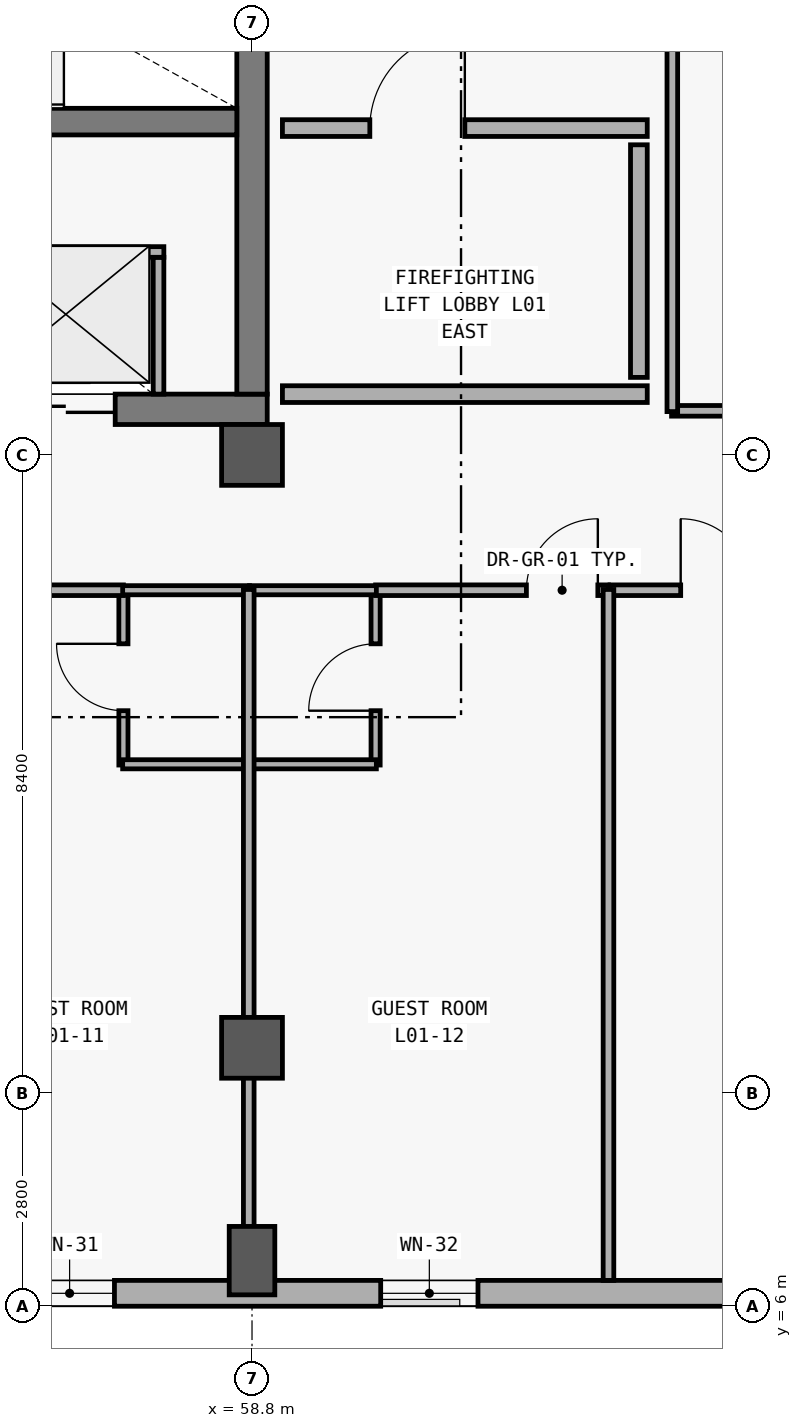
"""IFC4 building model, lengths in metres.
Left out: names, types, materials, properties, quantities, classifications, styles, units other than length and angle.
Written with IfcOpenShell. Run it as: python <this file> out.ifc"""

import sys

from ifc_helpers import new_model, si_unit, direction, frame, frame_2d, origin, origin_2d, place, context, subcontext, project, spatial, rectangle, extrude, element, fill, save


model = new_model("IFC4")
c1 = context("Model", 3, precision=1e-05, world=origin(), true_north=direction((0.0, 1.0)))
c2 = subcontext(c1, "Body", "Model", "MODEL_VIEW")
j1 = project(units=[si_unit("LENGTHUNIT", "METRE"), si_unit("PLANEANGLEUNIT", "RADIAN")], contexts=[c1])
p1 = place(None, origin())
s1 = spatial("IfcSite", under=j1, at=p1, CompositionType="ELEMENT")
p2 = place(p1, origin())
s2 = spatial("IfcBuilding", under=s1, at=p2, CompositionType="ELEMENT")
p3 = place(p2, frame((0.0, 0.0, 5.4)))
s3 = spatial("IfcBuildingStorey", under=s2, at=p3, CompositionType="ELEMENT", Elevation=5.4)
p4 = place(p3, frame((58.8, 6.6, 0.0), z_axis=(0.0, 0.0, 1.0), x_axis=(0.0, 1.0, 0.0)))
e1 = element("IfcColumn", 1, at=p4, inside=s3, PredefinedType="COLUMN", context=c2, shape_type="SweptSolid", body=[
    extrude(rectangle(XDim=0.6, YDim=0.9, at=origin_2d()), origin(), (0.0, 0.0, 1.0), 5.4),
])
for number, where, z_axis, x_axis in (
    (2, (58.8, 9.4, 0.0), (0.0, 0.0, 1.0), (1.0, 0.0, 0.0)),
    (3, (58.8, 17.2, 0.0), (0.0, 0.0, 1.0), (1.0, 0.0, 0.0)),
):
    element("IfcColumn", number, at=place(p3, frame(where, z_axis=z_axis, x_axis=x_axis)), inside=s3, PredefinedType="COLUMN", context=c2, shape_type="SweptSolid", body=[
        extrude(rectangle(XDim=0.8, YDim=0.8, at=origin_2d()), origin(), (0.0, 0.0, 1.0), 5.4),
    ])
p5 = place(p3, frame((92.06, 6.17, 0.0), z_axis=(0.0, 0.0, 1.0), x_axis=(-1.0, 0.0, 0.0)))
e4 = element("IfcWall", 4, at=p5, inside=s3, PredefinedType="SOLIDWALL", context=c2, shape_type="SweptSolid", body=[
    extrude(rectangle(XDim=83.32, YDim=0.34, at=frame_2d((41.66, 0.0))), origin(), (0.0, 0.0, 1.0), 5.1),
])
p6 = place(p5, frame((80.804, 0.0, 0.85)))
e5 = element("IfcOpeningElement", 5, at=p6, cuts=e4, PredefinedType="OPENING", context=c2, shape_type="SweptSolid", body=[
    extrude(rectangle(XDim=1.8, YDim=1.8, at=frame_2d((0.9, 0.9))), frame((0.0, 0.18, 0.0), z_axis=(0.0, -1.0, 0.0), x_axis=(1.0, 0.0, 0.0)), (0.0, 0.0, 1.0), 0.36),
])
p7 = place(p5, frame((78.043, 0.0, 0.85)))
e6 = element("IfcOpeningElement", 6, at=p7, cuts=e4, PredefinedType="OPENING", context=c2, shape_type="SweptSolid", body=[
    extrude(rectangle(XDim=1.5, YDim=1.75, at=frame_2d((0.75, 0.875))), frame((0.0, 0.18, 0.0), z_axis=(0.0, -1.0, 0.0), x_axis=(1.0, 0.0, 0.0)), (0.0, 0.0, 1.0), 0.36),
])
p8 = place(p5, frame((75.057, 0.0, 0.85)))
e7 = element("IfcOpeningElement", 7, at=p8, cuts=e4, PredefinedType="OPENING", context=c2, shape_type="SweptSolid", body=[
    extrude(rectangle(XDim=1.65, YDim=1.75, at=frame_2d((0.825, 0.875))), frame((0.0, 0.18, 0.0), z_axis=(0.0, -1.0, 0.0), x_axis=(1.0, 0.0, 0.0)), (0.0, 0.0, 1.0), 0.36),
])
p9 = place(p5, frame((71.997, 0.0, 0.85)))
e8 = element("IfcOpeningElement", 8, at=p9, cuts=e4, PredefinedType="OPENING", context=c2, shape_type="SweptSolid", body=[
    extrude(rectangle(XDim=1.95, YDim=1.75, at=frame_2d((0.975, 0.875))), frame((0.0, 0.18, 0.0), z_axis=(0.0, -1.0, 0.0), x_axis=(1.0, 0.0, 0.0)), (0.0, 0.0, 1.0), 0.36),
])
p10 = place(p5, frame((69.36, 0.0, 0.85)))
e9 = element("IfcOpeningElement", 9, at=p10, cuts=e4, PredefinedType="OPENING", context=c2, shape_type="SweptSolid", body=[
    extrude(rectangle(XDim=1.4, YDim=1.6, at=frame_2d((0.7, 0.8))), frame((0.0, 0.18, 0.0), z_axis=(0.0, -1.0, 0.0), x_axis=(1.0, 0.0, 0.0)), (0.0, 0.0, 1.0), 0.36),
])
p11 = place(p5, frame((66.349, 0.0, 0.85)))
e10 = element("IfcOpeningElement", 10, at=p11, cuts=e4, PredefinedType="OPENING", context=c2, shape_type="SweptSolid", body=[
    extrude(rectangle(XDim=1.6, YDim=1.6, at=frame_2d((0.8, 0.8))), frame((0.0, 0.18, 0.0), z_axis=(0.0, -1.0, 0.0), x_axis=(1.0, 0.0, 0.0)), (0.0, 0.0, 1.0), 0.36),
])
p12 = place(p5, frame((63.338, 0.0, 0.85)))
e11 = element("IfcOpeningElement", 11, at=p12, cuts=e4, PredefinedType="OPENING", context=c2, shape_type="SweptSolid", body=[
    extrude(rectangle(XDim=1.8, YDim=1.6, at=frame_2d((0.9, 0.8))), frame((0.0, 0.18, 0.0), z_axis=(0.0, -1.0, 0.0), x_axis=(1.0, 0.0, 0.0)), (0.0, 0.0, 1.0), 0.36),
])
p13 = place(p5, frame((60.327, 0.0, 0.85)))
e12 = element("IfcOpeningElement", 12, at=p13, cuts=e4, PredefinedType="OPENING", context=c2, shape_type="SweptSolid", body=[
    extrude(rectangle(XDim=2.0, YDim=1.65, at=frame_2d((1.0, 0.825))), frame((0.0, 0.18, 0.0), z_axis=(0.0, -1.0, 0.0), x_axis=(1.0, 0.0, 0.0)), (0.0, 0.0, 1.0), 0.36),
])
p14 = place(p5, frame((57.791, 0.0, 0.85)))
e13 = element("IfcOpeningElement", 13, at=p14, cuts=e4, PredefinedType="OPENING", context=c2, shape_type="SweptSolid", body=[
    extrude(rectangle(XDim=1.25, YDim=1.45, at=frame_2d((0.625, 0.725))), frame((0.0, 0.18, 0.0), z_axis=(0.0, -1.0, 0.0), x_axis=(1.0, 0.0, 0.0)), (0.0, 0.0, 1.0), 0.36),
])
p15 = place(p5, frame((38.744, 0.0, 0.85)))
e14 = element("IfcOpeningElement", 14, at=p15, cuts=e4, PredefinedType="OPENING", context=c2, shape_type="SweptSolid", body=[
    extrude(rectangle(XDim=3.3, YDim=2.15, at=frame_2d((1.65, 1.075))), frame((0.0, 0.18, 0.0), z_axis=(0.0, -1.0, 0.0), x_axis=(1.0, 0.0, 0.0)), (0.0, 0.0, 1.0), 0.36),
])
p16 = place(p5, frame((35.07, 0.0, 0.85)))
e15 = element("IfcOpeningElement", 15, at=p16, cuts=e4, PredefinedType="OPENING", context=c2, shape_type="SweptSolid", body=[
    extrude(rectangle(XDim=1.18, YDim=1.5, at=frame_2d((0.59, 0.75))), frame((0.0, 0.18, 0.0), z_axis=(0.0, -1.0, 0.0), x_axis=(1.0, 0.0, 0.0)), (0.0, 0.0, 1.0), 0.36),
])
p17 = place(p5, frame((30.287, 0.0, 0.85)))
e16 = element("IfcOpeningElement", 16, at=p17, cuts=e4, PredefinedType="OPENING", context=c2, shape_type="SweptSolid", body=[
    extrude(rectangle(XDim=1.28, YDim=1.6, at=frame_2d((0.64, 0.8))), frame((0.0, 0.18, 0.0), z_axis=(0.0, -1.0, 0.0), x_axis=(1.0, 0.0, 0.0)), (0.0, 0.0, 1.0), 0.36),
])
p18 = place(p5, frame((25.503, 0.0, 0.85)))
e17 = element("IfcOpeningElement", 17, at=p18, cuts=e4, PredefinedType="OPENING", context=c2, shape_type="SweptSolid", body=[
    extrude(rectangle(XDim=1.38, YDim=1.7, at=frame_2d((0.69, 0.85))), frame((0.0, 0.18, 0.0), z_axis=(0.0, -1.0, 0.0), x_axis=(1.0, 0.0, 0.0)), (0.0, 0.0, 1.0), 0.36),
])
p19 = place(p5, frame((20.72, 0.0, 0.85)))
e18 = element("IfcOpeningElement", 18, at=p19, cuts=e4, PredefinedType="OPENING", context=c2, shape_type="SweptSolid", body=[
    extrude(rectangle(XDim=1.48, YDim=1.8, at=frame_2d((0.74, 0.9))), frame((0.0, 0.18, 0.0), z_axis=(0.0, -1.0, 0.0), x_axis=(1.0, 0.0, 0.0)), (0.0, 0.0, 1.0), 0.36),
])
p20 = place(p5, frame((15.937, 0.0, 0.85)))
e19 = element("IfcOpeningElement", 19, at=p20, cuts=e4, PredefinedType="OPENING", context=c2, shape_type="SweptSolid", body=[
    extrude(rectangle(XDim=1.58, YDim=1.85, at=frame_2d((0.79, 0.925))), frame((0.0, 0.18, 0.0), z_axis=(0.0, -1.0, 0.0), x_axis=(1.0, 0.0, 0.0)), (0.0, 0.0, 1.0), 0.36),
])
p21 = place(p5, frame((11.154, 0.0, 0.85)))
e20 = element("IfcOpeningElement", 20, at=p21, cuts=e4, PredefinedType="OPENING", context=c2, shape_type="SweptSolid", body=[
    extrude(rectangle(XDim=1.68, YDim=1.9, at=frame_2d((0.84, 0.95))), frame((0.0, 0.18, 0.0), z_axis=(0.0, -1.0, 0.0), x_axis=(1.0, 0.0, 0.0)), (0.0, 0.0, 1.0), 0.36),
])
p22 = place(p5, frame((6.37, 0.0, 0.85)))
e21 = element("IfcOpeningElement", 21, at=p22, cuts=e4, PredefinedType="OPENING", context=c2, shape_type="SweptSolid", body=[
    extrude(rectangle(XDim=1.78, YDim=1.95, at=frame_2d((0.89, 0.975))), frame((0.0, 0.18, 0.0), z_axis=(0.0, -1.0, 0.0), x_axis=(1.0, 0.0, 0.0)), (0.0, 0.0, 1.0), 0.36),
])
p23 = place(p5, frame((1.586, 0.0, 0.85)))
e22 = element("IfcOpeningElement", 22, at=p23, cuts=e4, PredefinedType="OPENING", context=c2, shape_type="SweptSolid", body=[
    extrude(rectangle(XDim=1.88, YDim=1.95, at=frame_2d((0.94, 0.975))), frame((0.0, 0.18, 0.0), z_axis=(0.0, -1.0, 0.0), x_axis=(1.0, 0.0, 0.0)), (0.0, 0.0, 1.0), 0.36),
])
p24 = place(p3, frame((49.8, 17.8, 0.0), z_axis=(0.0, 0.0, 1.0), x_axis=(1.0, 0.0, 0.0)))
e23 = element("IfcWall", 23, at=p24, inside=s3, PredefinedType="SHEAR", context=c2, shape_type="SweptSolid", body=[
    extrude(rectangle(XDim=9.2, YDim=0.4, at=frame_2d((4.6, 0.0))), origin(), (0.0, 0.0, 1.0), 5.08),
])
p25 = place(p24, frame((1.1, 0.0, 0.0)))
e24 = element("IfcOpeningElement", 24, at=p25, cuts=e23, PredefinedType="OPENING", context=c2, shape_type="SweptSolid", body=[
    extrude(rectangle(XDim=1.2, YDim=2.2, at=frame_2d((0.6, 1.1))), frame((0.0, 0.21, 0.0), z_axis=(0.0, -1.0, 0.0), x_axis=(1.0, 0.0, 0.0)), (0.0, 0.0, 1.0), 0.42),
])
p26 = place(p24, frame((3.5, 0.0, 0.0)))
e25 = element("IfcOpeningElement", 25, at=p26, cuts=e23, PredefinedType="OPENING", context=c2, shape_type="SweptSolid", body=[
    extrude(rectangle(XDim=1.1, YDim=2.2, at=frame_2d((0.55, 1.1))), frame((0.0, 0.21, 0.0), z_axis=(0.0, -1.0, 0.0), x_axis=(1.0, 0.0, 0.0)), (0.0, 0.0, 1.0), 0.42),
])
p27 = place(p24, frame((5.9, 0.0, 0.0)))
e26 = element("IfcOpeningElement", 26, at=p27, cuts=e23, PredefinedType="OPENING", context=c2, shape_type="SweptSolid", body=[
    extrude(rectangle(XDim=1.3, YDim=2.3, at=frame_2d((0.65, 1.15))), frame((0.0, 0.21, 0.0), z_axis=(0.0, -1.0, 0.0), x_axis=(1.0, 0.0, 0.0)), (0.0, 0.0, 1.0), 0.42),
])
p28 = place(p3, frame((58.8, 18.0, 0.0), z_axis=(0.0, 0.0, 1.0), x_axis=(0.0, 1.0, 0.0)))
e27 = element("IfcWall", 27, at=p28, inside=s3, PredefinedType="SHEAR", context=c2, shape_type="SweptSolid", body=[
    extrude(rectangle(XDim=7.4, YDim=0.4, at=frame_2d((3.7, 0.0))), origin(), (0.0, 0.0, 1.0), 5.08),
])
p29 = place(p3, frame((50.2, 21.585, 0.0), z_axis=(0.0, 0.0, 1.0), x_axis=(1.0, 0.0, 0.0)))
e28 = element("IfcWall", 28, at=p29, inside=s3, PredefinedType="SHEAR", context=c2, shape_type="SweptSolid", body=[
    extrude(rectangle(XDim=8.4, YDim=0.35, at=frame_2d((4.2, 0.0))), origin(), (0.0, 0.0, 1.0), 5.08),
])
p30 = place(p3, frame((57.57, 18.0, 0.0), z_axis=(0.0, 0.0, 1.0), x_axis=(0.0, 1.0, 0.0)))
e29 = element("IfcWall", 29, at=p30, inside=s3, PredefinedType="PARTITIONING", context=c2, shape_type="SweptSolid", body=[
    extrude(rectangle(XDim=1.8, YDim=0.14, at=frame_2d((0.9, 0.0))), origin(), (0.0, 0.0, 1.0), 4.23),
])
p31 = place(p3, frame((50.26, 19.87, 0.0), z_axis=(0.0, 0.0, 1.0), x_axis=(1.0, 0.0, 0.0)))
e30 = element("IfcWall", 30, at=p31, inside=s3, PredefinedType="PARTITIONING", context=c2, shape_type="SweptSolid", body=[
    extrude(rectangle(XDim=7.38, YDim=0.14, at=frame_2d((3.69, 0.0))), origin(), (0.0, 0.0, 1.0), 4.23),
])
p32 = place(p3, frame((59.2, 18.0, 0.0), z_axis=(0.0, 0.0, 1.0), x_axis=(1.0, 0.0, 0.0)))
e31 = element("IfcWall", 31, at=p32, inside=s3, PredefinedType="SOLIDWALL", context=c2, shape_type="SweptSolid", body=[
    extrude(rectangle(XDim=4.8, YDim=0.22, at=frame_2d((2.4, 0.0))), origin(), (0.0, 0.0, 1.0), 4.23),
])
p33 = place(p3, frame((59.2, 21.5, 0.0), z_axis=(0.0, 0.0, 1.0), x_axis=(1.0, 0.0, 0.0)))
e32 = element("IfcWall", 32, at=p33, inside=s3, PredefinedType="SOLIDWALL", context=c2, shape_type="SweptSolid", body=[
    extrude(rectangle(XDim=4.8, YDim=0.22, at=frame_2d((2.4, 0.0))), origin(), (0.0, 0.0, 1.0), 4.23),
])
p34 = place(p33, frame((1.15, 0.0, 0.0)))
e33 = element("IfcOpeningElement", 33, at=p34, cuts=e32, PredefinedType="OPENING", context=c2, shape_type="SweptSolid", body=[
    extrude(rectangle(XDim=1.25, YDim=2.2, at=frame_2d((0.625, 1.1))), frame((0.0, 0.12, 0.0), z_axis=(0.0, -1.0, 0.0), x_axis=(1.0, 0.0, 0.0)), (0.0, 0.0, 1.0), 0.24),
])
p35 = place(p3, frame((63.89, 18.22, 0.0), z_axis=(0.0, 0.0, 1.0), x_axis=(0.0, 1.0, 0.0)))
e34 = element("IfcWall", 34, at=p35, inside=s3, PredefinedType="SOLIDWALL", context=c2, shape_type="SweptSolid", body=[
    extrude(rectangle(XDim=3.06, YDim=0.22, at=frame_2d((1.53, 0.0))), origin(), (0.0, 0.0, 1.0), 4.23),
])
p36 = place(p3, frame((57.108, 13.12, 0.0), z_axis=(0.0, 0.0, 1.0), x_axis=(0.0, 1.0, 0.0)))
e35 = element("IfcWall", 35, at=p36, inside=s3, PredefinedType="PARTITIONING", context=c2, shape_type="SweptSolid", body=[
    extrude(rectangle(XDim=2.31, YDim=0.12, at=frame_2d((1.155, 0.0))), origin(), (0.0, 0.0, 1.0), 4.18),
])
p37 = place(p36, frame((0.715, 0.0, 0.0)))
e36 = element("IfcOpeningElement", 36, at=p37, cuts=e35, PredefinedType="OPENING", context=c2, shape_type="SweptSolid", body=[
    extrude(rectangle(XDim=0.88, YDim=2.15, at=frame_2d((0.44, 1.075))), frame((0.0, 0.07, 0.0), z_axis=(0.0, -1.0, 0.0), x_axis=(1.0, 0.0, 0.0)), (0.0, 0.0, 1.0), 0.14),
])
p38 = place(p3, frame((60.426, 13.12, 0.0), z_axis=(0.0, 0.0, 1.0), x_axis=(0.0, 1.0, 0.0)))
e37 = element("IfcWall", 37, at=p38, inside=s3, PredefinedType="PARTITIONING", context=c2, shape_type="SweptSolid", body=[
    extrude(rectangle(XDim=2.31, YDim=0.12, at=frame_2d((1.155, 0.0))), origin(), (0.0, 0.0, 1.0), 4.18),
])
p39 = place(p38, frame((0.715, 0.0, 0.0)))
e38 = element("IfcOpeningElement", 38, at=p39, cuts=e37, PredefinedType="OPENING", context=c2, shape_type="SweptSolid", body=[
    extrude(rectangle(XDim=0.88, YDim=2.15, at=frame_2d((0.44, 1.075))), frame((0.0, 0.07, 0.0), z_axis=(0.0, -1.0, 0.0), x_axis=(1.0, 0.0, 0.0)), (0.0, 0.0, 1.0), 0.14),
])
p40 = place(p3, frame((64.32, 17.78, 0.0), z_axis=(0.0, 0.0, 1.0), x_axis=(1.0, 0.0, 0.0)))
e39 = element("IfcWall", 39, at=p40, inside=s3, PredefinedType="PARTITIONING", context=c2, shape_type="SweptSolid", body=[
    extrude(rectangle(XDim=27.74, YDim=0.14, at=frame_2d((13.87, 0.0))), origin(), (0.0, 0.0, 1.0), 4.18),
])
p41 = place(p40, frame((5.958, 0.0, 0.0)))
e40 = element("IfcOpeningElement", 40, at=p41, cuts=e39, PredefinedType="OPENING", context=c2, shape_type="SweptSolid", body=[
    extrude(rectangle(XDim=1.08, YDim=2.25, at=frame_2d((0.54, 1.125))), frame((0.0, 0.08, 0.0), z_axis=(0.0, -1.0, 0.0), x_axis=(1.0, 0.0, 0.0)), (0.0, 0.0, 1.0), 0.16),
])
p42 = place(p3, frame((54.043, 15.42, 0.0), z_axis=(0.0, 0.0, 1.0), x_axis=(1.0, 0.0, 0.0)))
e41 = element("IfcWall", 41, at=p42, inside=s3, PredefinedType="PARTITIONING", context=c2, shape_type="SweptSolid", body=[
    extrude(rectangle(XDim=3.065, YDim=0.14, at=frame_2d((1.532, 0.0))), origin(), (0.0, 0.0, 1.0), 4.18),
])
p43 = place(p42, frame((0.799, 0.0, 0.0)))
e42 = element("IfcOpeningElement", 42, at=p43, cuts=e41, PredefinedType="OPENING", context=c2, shape_type="SweptSolid", body=[
    extrude(rectangle(XDim=0.94, YDim=2.2, at=frame_2d((0.47, 1.1))), frame((0.0, 0.08, 0.0), z_axis=(0.0, -1.0, 0.0), x_axis=(1.0, 0.0, 0.0)), (0.0, 0.0, 1.0), 0.16),
])
p44 = place(p3, frame((60.426, 15.42, 0.0), z_axis=(0.0, 0.0, 1.0), x_axis=(1.0, 0.0, 0.0)))
e43 = element("IfcWall", 43, at=p44, inside=s3, PredefinedType="PARTITIONING", context=c2, shape_type="SweptSolid", body=[
    extrude(rectangle(XDim=3.064, YDim=0.14, at=frame_2d((1.532, 0.0))), origin(), (0.0, 0.0, 1.0), 4.18),
])
p45 = place(p44, frame((1.984, 0.0, 0.0)))
e44 = element("IfcOpeningElement", 44, at=p45, cuts=e43, PredefinedType="OPENING", context=c2, shape_type="SweptSolid", body=[
    extrude(rectangle(XDim=0.94, YDim=2.2, at=frame_2d((0.47, 1.1))), frame((0.0, 0.08, 0.0), z_axis=(0.0, -1.0, 0.0), x_axis=(1.0, 0.0, 0.0)), (0.0, 0.0, 1.0), 0.16),
])
p46 = place(p3, frame((63.51, 15.42, 0.0), z_axis=(0.0, 0.0, 1.0), x_axis=(1.0, 0.0, 0.0)))
e45 = element("IfcWall", 45, at=p46, inside=s3, PredefinedType="PARTITIONING", context=c2, shape_type="SweptSolid", body=[
    extrude(rectangle(XDim=3.064, YDim=0.14, at=frame_2d((1.532, 0.0))), origin(), (0.0, 0.0, 1.0), 4.18),
])
p47 = place(p46, frame((0.93, 0.0, 0.0)))
e46 = element("IfcOpeningElement", 46, at=p47, cuts=e45, PredefinedType="OPENING", context=c2, shape_type="SweptSolid", body=[
    extrude(rectangle(XDim=0.94, YDim=2.2, at=frame_2d((0.47, 1.1))), frame((0.0, 0.08, 0.0), z_axis=(0.0, -1.0, 0.0), x_axis=(1.0, 0.0, 0.0)), (0.0, 0.0, 1.0), 0.16),
])
for number, where, z_axis, x_axis in (
    (47, (57.098, 13.13, 0.0), (0.0, 0.0, 1.0), (1.0, 0.0, 0.0)),
    (48, (57.098, 15.42, 0.0), (0.0, 0.0, 1.0), (1.0, 0.0, 0.0)),
):
    element("IfcWall", number, at=place(p3, frame(where, z_axis=z_axis, x_axis=x_axis)), inside=s3, PredefinedType="PARTITIONING", context=c2, shape_type="SweptSolid", body=[
        extrude(rectangle(XDim=1.669, YDim=0.12, at=frame_2d((0.834, 0.0))), origin(), (0.0, 0.0, 1.0), 4.18),
    ])
for number, where, z_axis, x_axis in (
    (49, (58.767, 13.13, 0.0), (0.0, 0.0, 1.0), (1.0, 0.0, 0.0)),
    (50, (58.767, 15.42, 0.0), (0.0, 0.0, 1.0), (1.0, 0.0, 0.0)),
):
    element("IfcWall", number, at=place(p3, frame(where, z_axis=z_axis, x_axis=x_axis)), inside=s3, PredefinedType="PARTITIONING", context=c2, shape_type="SweptSolid", body=[
        extrude(rectangle(XDim=1.669, YDim=0.12, at=frame_2d((0.834, 0.0))), origin(), (0.0, 0.0, 1.0), 4.18),
    ])
p48 = place(p3, frame((64.33, 17.77, 0.0), z_axis=(0.0, 0.0, 1.0), x_axis=(0.0, 1.0, 0.0)))
e51 = element("IfcWall", 51, at=p48, inside=s3, PredefinedType="PARTITIONING", context=c2, shape_type="SweptSolid", body=[
    extrude(rectangle(XDim=7.36, YDim=0.14, at=frame_2d((3.68, 0.0))), origin(), (0.0, 0.0, 1.0), 4.18),
])
for number, where, z_axis, x_axis in (
    (52, (58.757, 6.34, 0.0), (0.0, 0.0, 1.0), (0.0, 1.0, 0.0)),
    (53, (63.49, 6.34, 0.0), (0.0, 0.0, 1.0), (0.0, 1.0, 0.0)),
):
    element("IfcWall", number, at=place(p3, frame(where, z_axis=z_axis, x_axis=x_axis)), inside=s3, PredefinedType="PARTITIONING", context=c2, shape_type="SweptSolid", body=[
        extrude(rectangle(XDim=9.09, YDim=0.14, at=frame_2d((4.545, 0.0))), origin(), (0.0, 0.0, 1.0), 4.18),
    ])
p49 = place(p16, origin())
e54 = element("IfcWindow", 54, at=p49, inside=s3, PartitioningType="SINGLE_PANEL", PredefinedType="WINDOW", context=c2, shape_type="SweptSolid", body=[
    extrude(rectangle(XDim=1.18, YDim=1.5, at=frame_2d((0.59, 0.75))), frame((0.0, 0.03, 0.0), z_axis=(0.0, -1.0, 0.0), x_axis=(1.0, 0.0, 0.0)), (0.0, 0.0, 1.0), 0.06),
])
fill(e15, e54)
p50 = place(p17, origin())
e55 = element("IfcWindow", 55, at=p50, inside=s3, PartitioningType="SINGLE_PANEL", PredefinedType="WINDOW", context=c2, shape_type="SweptSolid", body=[
    extrude(rectangle(XDim=1.28, YDim=1.6, at=frame_2d((0.64, 0.8))), frame((0.0, 0.03, 0.0), z_axis=(0.0, -1.0, 0.0), x_axis=(1.0, 0.0, 0.0)), (0.0, 0.0, 1.0), 0.06),
])
fill(e16, e55)
p51 = place(p27, origin())
e56 = element("IfcDoor", 56, at=p51, inside=s3, OperationType="DOUBLE_DOOR_SLIDING", PredefinedType="DOOR", context=c2, shape_type="SweptSolid", body=[
    extrude(rectangle(XDim=1.3, YDim=2.3, at=frame_2d((0.65, 1.15))), frame((0.0, 0.025, 0.0), z_axis=(0.0, -1.0, 0.0), x_axis=(1.0, 0.0, 0.0)), (0.0, 0.0, 1.0), 0.05),
])
fill(e26, e56)
p52 = place(p34, origin())
e57 = element("IfcDoor", 57, at=p52, inside=s3, OperationType="SINGLE_SWING_RIGHT", PredefinedType="DOOR", context=c2, shape_type="SweptSolid", body=[
    extrude(rectangle(XDim=1.25, YDim=2.2, at=frame_2d((0.625, 1.1))), frame((0.0, 0.025, 0.0), z_axis=(0.0, -1.0, 0.0), x_axis=(1.0, 0.0, 0.0)), (0.0, 0.0, 1.0), 0.05),
])
fill(e33, e57)
p53 = place(p37, origin())
e58 = element("IfcDoor", 58, at=p53, inside=s3, OperationType="SINGLE_SWING_RIGHT", PredefinedType="DOOR", context=c2, shape_type="SweptSolid", body=[
    extrude(rectangle(XDim=0.88, YDim=2.15, at=frame_2d((0.44, 1.075))), frame((0.0, 0.025, 0.0), z_axis=(0.0, -1.0, 0.0), x_axis=(1.0, 0.0, 0.0)), (0.0, 0.0, 1.0), 0.05),
])
fill(e36, e58)
p54 = place(p39, origin())
e59 = element("IfcDoor", 59, at=p54, inside=s3, OperationType="SINGLE_SWING_LEFT", PredefinedType="DOOR", context=c2, shape_type="SweptSolid", body=[
    extrude(rectangle(XDim=0.88, YDim=2.15, at=frame_2d((0.44, 1.075))), frame((0.0, 0.025, 0.0), z_axis=(0.0, -1.0, 0.0), x_axis=(1.0, 0.0, 0.0)), (0.0, 0.0, 1.0), 0.05),
])
fill(e38, e59)
p55 = place(p45, origin())
e60 = element("IfcDoor", 60, at=p55, inside=s3, OperationType="SINGLE_SWING_RIGHT", PredefinedType="DOOR", context=c2, shape_type="SweptSolid", body=[
    extrude(rectangle(XDim=0.94, YDim=2.2, at=frame_2d((0.47, 1.1))), frame((0.0, 0.025, 0.0), z_axis=(0.0, -1.0, 0.0), x_axis=(1.0, 0.0, 0.0)), (0.0, 0.0, 1.0), 0.05),
])
fill(e44, e60)
p56 = place(p47, origin())
e61 = element("IfcDoor", 61, at=p56, inside=s3, OperationType="SINGLE_SWING_LEFT", PredefinedType="DOOR", context=c2, shape_type="SweptSolid", body=[
    extrude(rectangle(XDim=0.94, YDim=2.2, at=frame_2d((0.47, 1.1))), frame((0.0, 0.025, 0.0), z_axis=(0.0, -1.0, 0.0), x_axis=(1.0, 0.0, 0.0)), (0.0, 0.0, 1.0), 0.05),
])
fill(e46, e61)
save(model, sys.argv[1])
